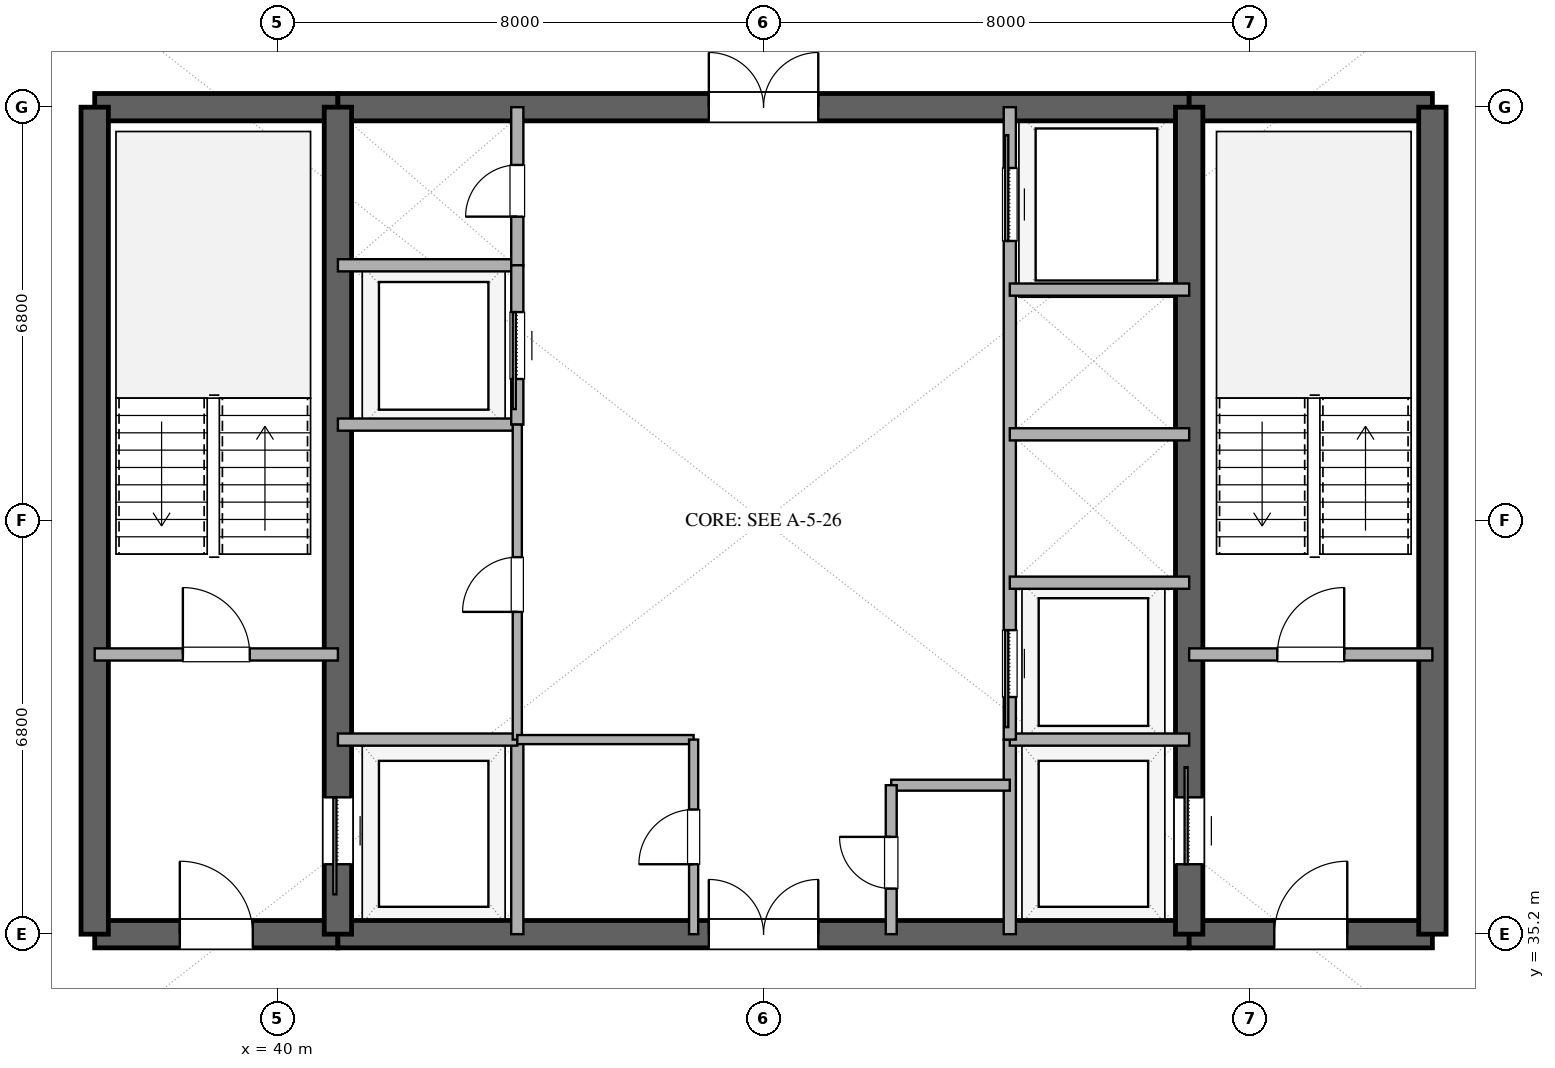
"""IFC4 building model, lengths in metres.
Left out: names, types, materials, properties, quantities, classifications, styles, units other than length and angle.
Written with IfcOpenShell. Run it as: python <this file> out.ifc"""

import sys

from ifc_helpers import new_model, si_unit, direction, frame, frame_2d, origin, place, context, subcontext, project, spatial, rectangle, extrude, element, fill, save


model = new_model("IFC4")
c1 = context("Model", 3, precision=1e-05, world=origin(), true_north=direction((0.0, 1.0)))
c2 = subcontext(c1, "Body", "Model", "MODEL_VIEW")
j1 = project(units=[si_unit("LENGTHUNIT", "METRE"), si_unit("PLANEANGLEUNIT", "RADIAN")], contexts=[c1])
p1 = place(None, origin())
s1 = spatial("IfcSite", under=j1, at=p1, CompositionType="ELEMENT")
p2 = place(p1, origin())
s2 = spatial("IfcBuilding", under=s1, at=p2, CompositionType="ELEMENT")
p3 = place(p2, frame((0.0, 0.0, 168.6)))
s3 = spatial("IfcBuildingStorey", under=s2, at=p3, CompositionType="ELEMENT", Elevation=168.6)
p4 = place(p3, frame((37.0, 35.2, 0.0), z_axis=(0.0, 0.0, 1.0), x_axis=(1.0, 0.0, 0.0)))
e1 = element("IfcWall", 1, at=p4, inside=s3, PredefinedType="SHEAR", context=c2, shape_type="SweptSolid", body=[
    extrude(rectangle(XDim=4.0, YDim=0.45, at=frame_2d((2.0, 0.0))), origin(), (0.0, 0.0, 1.0), 3.38),
])
p5 = place(p4, frame((1.4, 0.0, 0.0)))
e2 = element("IfcOpeningElement", 2, at=p5, cuts=e1, PredefinedType="OPENING", context=c2, shape_type="SweptSolid", body=[
    extrude(rectangle(XDim=1.2, YDim=2.15, at=frame_2d((0.6, 1.075))), frame((0.0, 0.235, 0.0), z_axis=(0.0, -1.0, 0.0), x_axis=(1.0, 0.0, 0.0)), (0.0, 0.0, 1.0), 0.47),
])
p6 = place(p3, frame((41.0, 35.2, 0.0), z_axis=(0.0, 0.0, 1.0), x_axis=(1.0, 0.0, 0.0)))
e3 = element("IfcWall", 3, at=p6, inside=s3, PredefinedType="SHEAR", context=c2, shape_type="SweptSolid", body=[
    extrude(rectangle(XDim=14.0, YDim=0.45, at=frame_2d((7.0, 0.0))), origin(), (0.0, 0.0, 1.0), 3.38),
])
p7 = place(p6, frame((6.1, 0.0, 0.0)))
e4 = element("IfcOpeningElement", 4, at=p7, cuts=e3, PredefinedType="OPENING", context=c2, shape_type="SweptSolid", body=[
    extrude(rectangle(XDim=1.8, YDim=2.25, at=frame_2d((0.9, 1.125))), frame((0.0, 0.235, 0.0), z_axis=(0.0, -1.0, 0.0), x_axis=(1.0, 0.0, 0.0)), (0.0, 0.0, 1.0), 0.47),
])
p8 = place(p3, frame((55.0, 35.2, 0.0), z_axis=(0.0, 0.0, 1.0), x_axis=(1.0, 0.0, 0.0)))
e5 = element("IfcWall", 5, at=p8, inside=s3, PredefinedType="SHEAR", context=c2, shape_type="SweptSolid", body=[
    extrude(rectangle(XDim=4.0, YDim=0.45, at=frame_2d((2.0, 0.0))), origin(), (0.0, 0.0, 1.0), 3.38),
])
p9 = place(p8, frame((1.4, 0.0, 0.0)))
e6 = element("IfcOpeningElement", 6, at=p9, cuts=e5, PredefinedType="OPENING", context=c2, shape_type="SweptSolid", body=[
    extrude(rectangle(XDim=1.2, YDim=2.15, at=frame_2d((0.6, 1.075))), frame((0.0, 0.235, 0.0), z_axis=(0.0, -1.0, 0.0), x_axis=(1.0, 0.0, 0.0)), (0.0, 0.0, 1.0), 0.47),
])
p10 = place(p3, frame((37.0, 48.8, 0.0), z_axis=(0.0, 0.0, 1.0), x_axis=(1.0, 0.0, 0.0)))
e7 = element("IfcWall", 7, at=p10, inside=s3, PredefinedType="SHEAR", context=c2, shape_type="SweptSolid", body=[
    extrude(rectangle(XDim=4.0, YDim=0.45, at=frame_2d((2.0, 0.0))), origin(), (0.0, 0.0, 1.0), 3.38),
])
p11 = place(p3, frame((41.0, 48.8, 0.0), z_axis=(0.0, 0.0, 1.0), x_axis=(1.0, 0.0, 0.0)))
e8 = element("IfcWall", 8, at=p11, inside=s3, PredefinedType="SHEAR", context=c2, shape_type="SweptSolid", body=[
    extrude(rectangle(XDim=14.0, YDim=0.45, at=frame_2d((7.0, 0.0))), origin(), (0.0, 0.0, 1.0), 3.38),
])
p12 = place(p11, frame((6.1, 0.0, 0.0)))
e9 = element("IfcOpeningElement", 9, at=p12, cuts=e8, PredefinedType="OPENING", context=c2, shape_type="SweptSolid", body=[
    extrude(rectangle(XDim=1.8, YDim=2.25, at=frame_2d((0.9, 1.125))), frame((0.0, 0.235, 0.0), z_axis=(0.0, -1.0, 0.0), x_axis=(1.0, 0.0, 0.0)), (0.0, 0.0, 1.0), 0.47),
])
p13 = place(p3, frame((55.0, 48.8, 0.0), z_axis=(0.0, 0.0, 1.0), x_axis=(1.0, 0.0, 0.0)))
e10 = element("IfcWall", 10, at=p13, inside=s3, PredefinedType="SHEAR", context=c2, shape_type="SweptSolid", body=[
    extrude(rectangle(XDim=4.0, YDim=0.45, at=frame_2d((2.0, 0.0))), origin(), (0.0, 0.0, 1.0), 3.38),
])
for number, where, z_axis, x_axis in (
    (11, (37.0, 35.2, 0.0), (0.0, 0.0, 1.0), (0.0, 1.0, 0.0)),
    (12, (59.0, 35.2, 0.0), (0.0, 0.0, 1.0), (0.0, 1.0, 0.0)),
):
    element("IfcWall", number, at=place(p3, frame(where, z_axis=z_axis, x_axis=x_axis)), inside=s3, PredefinedType="SHEAR", context=c2, shape_type="SweptSolid", body=[
        extrude(rectangle(XDim=13.6, YDim=0.45, at=frame_2d((6.8, 0.0))), origin(), (0.0, 0.0, 1.0), 3.38),
    ])
p14 = place(p3, frame((41.0, 35.2, 0.0), z_axis=(0.0, 0.0, 1.0), x_axis=(0.0, 1.0, 0.0)))
e13 = element("IfcWall", 13, at=p14, inside=s3, PredefinedType="SHEAR", context=c2, shape_type="SweptSolid", body=[
    extrude(rectangle(XDim=13.6, YDim=0.45, at=frame_2d((6.8, 0.0))), origin(), (0.0, 0.0, 1.0), 3.38),
])
p15 = place(p14, frame((1.15, 0.0, 0.0)))
e14 = element("IfcOpeningElement", 14, at=p15, cuts=e13, PredefinedType="OPENING", context=c2, shape_type="SweptSolid", body=[
    extrude(rectangle(XDim=1.1, YDim=2.2, at=frame_2d((0.55, 1.1))), frame((0.0, 0.235, 0.0), z_axis=(0.0, -1.0, 0.0), x_axis=(1.0, 0.0, 0.0)), (0.0, 0.0, 1.0), 0.47),
])
p16 = place(p3, frame((55.0, 35.2, 0.0), z_axis=(0.0, 0.0, 1.0), x_axis=(0.0, 1.0, 0.0)))
e15 = element("IfcWall", 15, at=p16, inside=s3, PredefinedType="SHEAR", context=c2, shape_type="SweptSolid", body=[
    extrude(rectangle(XDim=13.6, YDim=0.45, at=frame_2d((6.8, 0.0))), origin(), (0.0, 0.0, 1.0), 3.38),
])
p17 = place(p16, frame((1.15, 0.0, 0.0)))
e16 = element("IfcOpeningElement", 16, at=p17, cuts=e15, PredefinedType="OPENING", context=c2, shape_type="SweptSolid", body=[
    extrude(rectangle(XDim=1.1, YDim=2.2, at=frame_2d((0.55, 1.1))), frame((0.0, 0.235, 0.0), z_axis=(0.0, -1.0, 0.0), x_axis=(1.0, 0.0, 0.0)), (0.0, 0.0, 1.0), 0.47),
])
p18 = place(p3, frame((37.0, 39.8, 0.0), z_axis=(0.0, 0.0, 1.0), x_axis=(1.0, 0.0, 0.0)))
e17 = element("IfcWall", 17, at=p18, inside=s3, PredefinedType="SOLIDWALL", context=c2, shape_type="SweptSolid", body=[
    extrude(rectangle(XDim=4.0, YDim=0.2, at=frame_2d((2.0, 0.0))), origin(), (0.0, 0.0, 1.0), 2.74),
])
p19 = place(p18, frame((1.45, 0.0, 0.0)))
e18 = element("IfcOpeningElement", 18, at=p19, cuts=e17, PredefinedType="OPENING", context=c2, shape_type="SweptSolid", body=[
    extrude(rectangle(XDim=1.1, YDim=2.15, at=frame_2d((0.55, 1.075))), frame((0.0, 0.11, 0.0), z_axis=(0.0, -1.0, 0.0), x_axis=(1.0, 0.0, 0.0)), (0.0, 0.0, 1.0), 0.22),
])
p20 = place(p3, frame((55.0, 39.8, 0.0), z_axis=(0.0, 0.0, 1.0), x_axis=(1.0, 0.0, 0.0)))
e19 = element("IfcWall", 19, at=p20, inside=s3, PredefinedType="SOLIDWALL", context=c2, shape_type="SweptSolid", body=[
    extrude(rectangle(XDim=4.0, YDim=0.2, at=frame_2d((2.0, 0.0))), origin(), (0.0, 0.0, 1.0), 2.74),
])
p21 = place(p20, frame((1.45, 0.0, 0.0)))
e20 = element("IfcOpeningElement", 20, at=p21, cuts=e19, PredefinedType="OPENING", context=c2, shape_type="SweptSolid", body=[
    extrude(rectangle(XDim=1.1, YDim=2.15, at=frame_2d((0.55, 1.075))), frame((0.0, 0.11, 0.0), z_axis=(0.0, -1.0, 0.0), x_axis=(1.0, 0.0, 0.0)), (0.0, 0.0, 1.0), 0.22),
])
p22 = place(p3, frame((43.95, 35.2, 0.0), z_axis=(0.0, 0.0, 1.0), x_axis=(0.0, 1.0, 0.0)))
e21 = element("IfcWall", 21, at=p22, inside=s3, PredefinedType="SOLIDWALL", context=c2, shape_type="SweptSolid", body=[
    extrude(rectangle(XDim=3.2, YDim=0.2, at=frame_2d((1.6, 0.0))), origin(), (0.0, 0.0, 1.0), 2.74),
])
p23 = place(p3, frame((41.0, 38.4, 0.0), z_axis=(0.0, 0.0, 1.0), x_axis=(1.0, 0.0, 0.0)))
e22 = element("IfcWall", 22, at=p23, inside=s3, PredefinedType="SOLIDWALL", context=c2, shape_type="SweptSolid", body=[
    extrude(rectangle(XDim=2.95, YDim=0.2, at=frame_2d((1.475, 0.0))), origin(), (0.0, 0.0, 1.0), 2.74),
])
p24 = place(p3, frame((52.05, 35.2, 0.0), z_axis=(0.0, 0.0, 1.0), x_axis=(0.0, 1.0, 0.0)))
e23 = element("IfcWall", 23, at=p24, inside=s3, PredefinedType="SOLIDWALL", context=c2, shape_type="SweptSolid", body=[
    extrude(rectangle(XDim=3.2, YDim=0.2, at=frame_2d((1.6, 0.0))), origin(), (0.0, 0.0, 1.0), 2.74),
])
for number, where, z_axis, x_axis in (
    (24, (52.05, 38.4, 0.0), (0.0, 0.0, 1.0), (1.0, 0.0, 0.0)),
    (25, (41.0, 46.2, 0.0), (0.0, 0.0, 1.0), (1.0, 0.0, 0.0)),
):
    element("IfcWall", number, at=place(p3, frame(where, z_axis=z_axis, x_axis=x_axis)), inside=s3, PredefinedType="SOLIDWALL", context=c2, shape_type="SweptSolid", body=[
        extrude(rectangle(XDim=2.95, YDim=0.2, at=frame_2d((1.475, 0.0))), origin(), (0.0, 0.0, 1.0), 2.74),
    ])
p25 = place(p3, frame((43.95, 46.2, 0.0), z_axis=(0.0, 0.0, 1.0), x_axis=(0.0, 1.0, 0.0)))
e26 = element("IfcWall", 26, at=p25, inside=s3, PredefinedType="SOLIDWALL", context=c2, shape_type="SweptSolid", body=[
    extrude(rectangle(XDim=2.6, YDim=0.2, at=frame_2d((1.3, 0.0))), origin(), (0.0, 0.0, 1.0), 2.74),
])
p26 = place(p25, frame((0.8, 0.0, 0.0)))
e27 = element("IfcOpeningElement", 27, at=p26, cuts=e26, PredefinedType="OPENING", context=c2, shape_type="SweptSolid", body=[
    extrude(rectangle(XDim=0.85, YDim=2.15, at=frame_2d((0.425, 1.075))), frame((0.0, 0.11, 0.0), z_axis=(0.0, -1.0, 0.0), x_axis=(1.0, 0.0, 0.0)), (0.0, 0.0, 1.0), 0.22),
])
p27 = place(p3, frame((41.0, 43.58, 0.0), z_axis=(0.0, 0.0, 1.0), x_axis=(1.0, 0.0, 0.0)))
e28 = element("IfcWall", 28, at=p27, inside=s3, PredefinedType="SOLIDWALL", context=c2, shape_type="SweptSolid", body=[
    extrude(rectangle(XDim=2.95, YDim=0.2, at=frame_2d((1.475, 0.0))), origin(), (0.0, 0.0, 1.0), 2.74),
])
p28 = place(p3, frame((43.95, 43.58, 0.0), z_axis=(0.0, 0.0, 1.0), x_axis=(0.0, 1.0, 0.0)))
e29 = element("IfcWall", 29, at=p28, inside=s3, PredefinedType="SOLIDWALL", context=c2, shape_type="SweptSolid", body=[
    extrude(rectangle(XDim=2.62, YDim=0.2, at=frame_2d((1.31, 0.0))), origin(), (0.0, 0.0, 1.0), 2.74),
])
p29 = place(p28, frame((0.75, 0.0, 0.0)))
e30 = element("IfcOpeningElement", 30, at=p29, cuts=e29, PredefinedType="OPENING", context=c2, shape_type="SweptSolid", body=[
    extrude(rectangle(XDim=1.1, YDim=2.2, at=frame_2d((0.55, 1.1))), frame((0.0, 0.11, 0.0), z_axis=(0.0, -1.0, 0.0), x_axis=(1.0, 0.0, 0.0)), (0.0, 0.0, 1.0), 0.22),
])
p30 = place(p3, frame((43.95, 38.4, 0.0), z_axis=(0.0, 0.0, 1.0), x_axis=(0.0, 1.0, 0.0)))
e31 = element("IfcWall", 31, at=p30, inside=s3, PredefinedType="PARTITIONING", context=c2, shape_type="SweptSolid", body=[
    extrude(rectangle(XDim=5.18, YDim=0.15, at=frame_2d((2.59, 0.0))), origin(), (0.0, 0.0, 1.0), 2.74),
])
p31 = place(p30, frame((2.1, 0.0, 0.0)))
e32 = element("IfcOpeningElement", 32, at=p31, cuts=e31, PredefinedType="OPENING", context=c2, shape_type="SweptSolid", body=[
    extrude(rectangle(XDim=0.9, YDim=2.15, at=frame_2d((0.45, 1.075))), frame((0.0, 0.085, 0.0), z_axis=(0.0, -1.0, 0.0), x_axis=(1.0, 0.0, 0.0)), (0.0, 0.0, 1.0), 0.17),
])
p32 = place(p3, frame((52.05, 38.4, 0.0), z_axis=(0.0, 0.0, 1.0), x_axis=(0.0, 1.0, 0.0)))
e33 = element("IfcWall", 33, at=p32, inside=s3, PredefinedType="SOLIDWALL", context=c2, shape_type="SweptSolid", body=[
    extrude(rectangle(XDim=10.4, YDim=0.2, at=frame_2d((5.2, 0.0))), origin(), (0.0, 0.0, 1.0), 2.74),
])
p33 = place(p32, frame((0.7, 0.0, 0.0)))
e34 = element("IfcOpeningElement", 34, at=p33, cuts=e33, PredefinedType="OPENING", context=c2, shape_type="SweptSolid", body=[
    extrude(rectangle(XDim=1.1, YDim=2.2, at=frame_2d((0.55, 1.1))), frame((0.0, 0.11, 0.0), z_axis=(0.0, -1.0, 0.0), x_axis=(1.0, 0.0, 0.0)), (0.0, 0.0, 1.0), 0.22),
])
p34 = place(p32, frame((8.2, 0.0, 0.0)))
e35 = element("IfcOpeningElement", 35, at=p34, cuts=e33, PredefinedType="OPENING", context=c2, shape_type="SweptSolid", body=[
    extrude(rectangle(XDim=1.2, YDim=2.2, at=frame_2d((0.6, 1.1))), frame((0.0, 0.11, 0.0), z_axis=(0.0, -1.0, 0.0), x_axis=(1.0, 0.0, 0.0)), (0.0, 0.0, 1.0), 0.22),
])
for number, where, z_axis, x_axis in (
    (36, (52.05, 40.98, 0.0), (0.0, 0.0, 1.0), (1.0, 0.0, 0.0)),
    (37, (52.05, 43.42, 0.0), (0.0, 0.0, 1.0), (1.0, 0.0, 0.0)),
    (38, (52.05, 45.8, 0.0), (0.0, 0.0, 1.0), (1.0, 0.0, 0.0)),
):
    element("IfcWall", number, at=place(p3, frame(where, z_axis=z_axis, x_axis=x_axis)), inside=s3, PredefinedType="SOLIDWALL", context=c2, shape_type="SweptSolid", body=[
        extrude(rectangle(XDim=2.95, YDim=0.2, at=frame_2d((1.475, 0.0))), origin(), (0.0, 0.0, 1.0), 2.74),
    ])
p35 = place(p3, frame((43.95, 38.4, 0.0), z_axis=(0.0, 0.0, 1.0), x_axis=(1.0, 0.0, 0.0)))
e39 = element("IfcWall", 39, at=p35, inside=s3, PredefinedType="PARTITIONING", context=c2, shape_type="SweptSolid", body=[
    extrude(rectangle(XDim=2.9, YDim=0.15, at=frame_2d((1.45, 0.0))), origin(), (0.0, 0.0, 1.0), 2.74),
])
p36 = place(p3, frame((46.85, 35.2, 0.0), z_axis=(0.0, 0.0, 1.0), x_axis=(0.0, 1.0, 0.0)))
e40 = element("IfcWall", 40, at=p36, inside=s3, PredefinedType="PARTITIONING", context=c2, shape_type="SweptSolid", body=[
    extrude(rectangle(XDim=3.2, YDim=0.15, at=frame_2d((1.6, 0.0))), origin(), (0.0, 0.0, 1.0), 2.74),
])
p37 = place(p36, frame((1.15, 0.0, 0.0)))
e41 = element("IfcOpeningElement", 41, at=p37, cuts=e40, PredefinedType="OPENING", context=c2, shape_type="SweptSolid", body=[
    extrude(rectangle(XDim=0.9, YDim=2.15, at=frame_2d((0.45, 1.075))), frame((0.0, 0.085, 0.0), z_axis=(0.0, -1.0, 0.0), x_axis=(1.0, 0.0, 0.0)), (0.0, 0.0, 1.0), 0.17),
])
p38 = place(p3, frame((50.1, 37.65, 0.0), z_axis=(0.0, 0.0, 1.0), x_axis=(1.0, 0.0, 0.0)))
e42 = element("IfcWall", 42, at=p38, inside=s3, PredefinedType="PLUMBINGWALL", context=c2, shape_type="SweptSolid", body=[
    extrude(rectangle(XDim=1.95, YDim=0.18, at=frame_2d((0.975, 0.0))), origin(), (0.0, 0.0, 1.0), 2.74),
])
p39 = place(p3, frame((50.1, 35.2, 0.0), z_axis=(0.0, 0.0, 1.0), x_axis=(0.0, 1.0, 0.0)))
e43 = element("IfcWall", 43, at=p39, inside=s3, PredefinedType="PLUMBINGWALL", context=c2, shape_type="SweptSolid", body=[
    extrude(rectangle(XDim=2.45, YDim=0.18, at=frame_2d((1.225, 0.0))), origin(), (0.0, 0.0, 1.0), 2.74),
])
p40 = place(p39, frame((0.75, 0.0, 0.0)))
e44 = element("IfcOpeningElement", 44, at=p40, cuts=e43, PredefinedType="OPENING", context=c2, shape_type="SweptSolid", body=[
    extrude(rectangle(XDim=0.85, YDim=2.1, at=frame_2d((0.425, 1.05))), frame((0.0, 0.1, 0.0), z_axis=(0.0, -1.0, 0.0), x_axis=(1.0, 0.0, 0.0)), (0.0, 0.0, 1.0), 0.2),
])
p41 = place(p15, origin())
e45 = element("IfcDoor", 45, at=p41, inside=s3, OperationType="SLIDING_TO_LEFT", PredefinedType="DOOR", context=c2, shape_type="SweptSolid", body=[
    extrude(rectangle(XDim=1.1, YDim=2.2, at=frame_2d((0.55, 1.1))), frame((0.0, 0.025, 0.0), z_axis=(0.0, -1.0, 0.0), x_axis=(1.0, 0.0, 0.0)), (0.0, 0.0, 1.0), 0.05),
])
fill(e14, e45)
p42 = place(p17, origin())
e46 = element("IfcDoor", 46, at=p42, inside=s3, OperationType="SLIDING_TO_RIGHT", PredefinedType="DOOR", context=c2, shape_type="SweptSolid", body=[
    extrude(rectangle(XDim=1.1, YDim=2.2, at=frame_2d((0.55, 1.1))), frame((0.0, 0.025, 0.0), z_axis=(0.0, -1.0, 0.0), x_axis=(1.0, 0.0, 0.0)), (0.0, 0.0, 1.0), 0.05),
])
fill(e16, e46)
p43 = place(p5, origin())
e47 = element("IfcDoor", 47, at=p43, inside=s3, OperationType="SINGLE_SWING_LEFT", PredefinedType="DOOR", context=c2, shape_type="SweptSolid", body=[
    extrude(rectangle(XDim=1.2, YDim=2.15, at=frame_2d((0.6, 1.075))), frame((0.0, 0.025, 0.0), z_axis=(0.0, -1.0, 0.0), x_axis=(1.0, 0.0, 0.0)), (0.0, 0.0, 1.0), 0.05),
])
fill(e2, e47)
p44 = place(p9, origin())
e48 = element("IfcDoor", 48, at=p44, inside=s3, OperationType="SINGLE_SWING_RIGHT", PredefinedType="DOOR", context=c2, shape_type="SweptSolid", body=[
    extrude(rectangle(XDim=1.2, YDim=2.15, at=frame_2d((0.6, 1.075))), frame((0.0, 0.025, 0.0), z_axis=(0.0, -1.0, 0.0), x_axis=(1.0, 0.0, 0.0)), (0.0, 0.0, 1.0), 0.05),
])
fill(e6, e48)
p45 = place(p7, origin())
e49 = element("IfcDoor", 49, at=p45, inside=s3, OperationType="DOUBLE_DOOR_SINGLE_SWING", PredefinedType="DOOR", context=c2, shape_type="SweptSolid", body=[
    extrude(rectangle(XDim=1.8, YDim=2.25, at=frame_2d((0.9, 1.125))), frame((0.0, 0.025, 0.0), z_axis=(0.0, -1.0, 0.0), x_axis=(1.0, 0.0, 0.0)), (0.0, 0.0, 1.0), 0.05),
])
fill(e4, e49)
p46 = place(p12, origin())
e50 = element("IfcDoor", 50, at=p46, inside=s3, OperationType="DOUBLE_DOOR_SINGLE_SWING", PredefinedType="DOOR", context=c2, shape_type="SweptSolid", body=[
    extrude(rectangle(XDim=1.8, YDim=2.25, at=frame_2d((0.9, 1.125))), frame((0.0, 0.025, 0.0), z_axis=(0.0, -1.0, 0.0), x_axis=(1.0, 0.0, 0.0)), (0.0, 0.0, 1.0), 0.05),
])
fill(e9, e50)
p47 = place(p19, origin())
e51 = element("IfcDoor", 51, at=p47, inside=s3, OperationType="SINGLE_SWING_LEFT", PredefinedType="DOOR", context=c2, shape_type="SweptSolid", body=[
    extrude(rectangle(XDim=1.1, YDim=2.15, at=frame_2d((0.55, 1.075))), frame((0.0, 0.025, 0.0), z_axis=(0.0, -1.0, 0.0), x_axis=(1.0, 0.0, 0.0)), (0.0, 0.0, 1.0), 0.05),
])
fill(e18, e51)
p48 = place(p21, origin())
e52 = element("IfcDoor", 52, at=p48, inside=s3, OperationType="SINGLE_SWING_RIGHT", PredefinedType="DOOR", context=c2, shape_type="SweptSolid", body=[
    extrude(rectangle(XDim=1.1, YDim=2.15, at=frame_2d((0.55, 1.075))), frame((0.0, 0.025, 0.0), z_axis=(0.0, -1.0, 0.0), x_axis=(1.0, 0.0, 0.0)), (0.0, 0.0, 1.0), 0.05),
])
fill(e20, e52)
p49 = place(p26, origin())
e53 = element("IfcDoor", 53, at=p49, inside=s3, OperationType="SINGLE_SWING_LEFT", PredefinedType="DOOR", context=c2, shape_type="SweptSolid", body=[
    extrude(rectangle(XDim=0.85, YDim=2.15, at=frame_2d((0.425, 1.075))), frame((0.0, 0.025, 0.0), z_axis=(0.0, -1.0, 0.0), x_axis=(1.0, 0.0, 0.0)), (0.0, 0.0, 1.0), 0.05),
])
fill(e27, e53)
p50 = place(p29, origin())
e54 = element("IfcDoor", 54, at=p50, inside=s3, OperationType="SLIDING_TO_LEFT", PredefinedType="DOOR", context=c2, shape_type="SweptSolid", body=[
    extrude(rectangle(XDim=1.1, YDim=2.2, at=frame_2d((0.55, 1.1))), frame((0.0, 0.025, 0.0), z_axis=(0.0, -1.0, 0.0), x_axis=(1.0, 0.0, 0.0)), (0.0, 0.0, 1.0), 0.05),
])
fill(e30, e54)
p51 = place(p31, origin())
e55 = element("IfcDoor", 55, at=p51, inside=s3, OperationType="SINGLE_SWING_LEFT", PredefinedType="DOOR", context=c2, shape_type="SweptSolid", body=[
    extrude(rectangle(XDim=0.9, YDim=2.15, at=frame_2d((0.45, 1.075))), frame((0.0, 0.025, 0.0), z_axis=(0.0, -1.0, 0.0), x_axis=(1.0, 0.0, 0.0)), (0.0, 0.0, 1.0), 0.05),
])
fill(e32, e55)
p52 = place(p33, origin())
e56 = element("IfcDoor", 56, at=p52, inside=s3, OperationType="SLIDING_TO_LEFT", PredefinedType="DOOR", context=c2, shape_type="SweptSolid", body=[
    extrude(rectangle(XDim=1.1, YDim=2.2, at=frame_2d((0.55, 1.1))), frame((0.0, 0.025, 0.0), z_axis=(0.0, -1.0, 0.0), x_axis=(1.0, 0.0, 0.0)), (0.0, 0.0, 1.0), 0.05),
])
fill(e34, e56)
p53 = place(p34, origin())
e57 = element("IfcDoor", 57, at=p53, inside=s3, OperationType="SLIDING_TO_RIGHT", PredefinedType="DOOR", context=c2, shape_type="SweptSolid", body=[
    extrude(rectangle(XDim=1.2, YDim=2.2, at=frame_2d((0.6, 1.1))), frame((0.0, 0.025, 0.0), z_axis=(0.0, -1.0, 0.0), x_axis=(1.0, 0.0, 0.0)), (0.0, 0.0, 1.0), 0.05),
])
fill(e35, e57)
p54 = place(p37, origin())
e58 = element("IfcDoor", 58, at=p54, inside=s3, OperationType="SINGLE_SWING_LEFT", PredefinedType="DOOR", context=c2, shape_type="SweptSolid", body=[
    extrude(rectangle(XDim=0.9, YDim=2.15, at=frame_2d((0.45, 1.075))), frame((0.0, 0.025, 0.0), z_axis=(0.0, -1.0, 0.0), x_axis=(1.0, 0.0, 0.0)), (0.0, 0.0, 1.0), 0.05),
])
fill(e41, e58)
p55 = place(p40, origin())
e59 = element("IfcDoor", 59, at=p55, inside=s3, OperationType="SINGLE_SWING_RIGHT", PredefinedType="DOOR", context=c2, shape_type="SweptSolid", body=[
    extrude(rectangle(XDim=0.85, YDim=2.1, at=frame_2d((0.425, 1.05))), frame((0.0, 0.025, 0.0), z_axis=(0.0, -1.0, 0.0), x_axis=(1.0, 0.0, 0.0)), (0.0, 0.0, 1.0), 0.05),
])
fill(e44, e59)
save(model, sys.argv[1])
